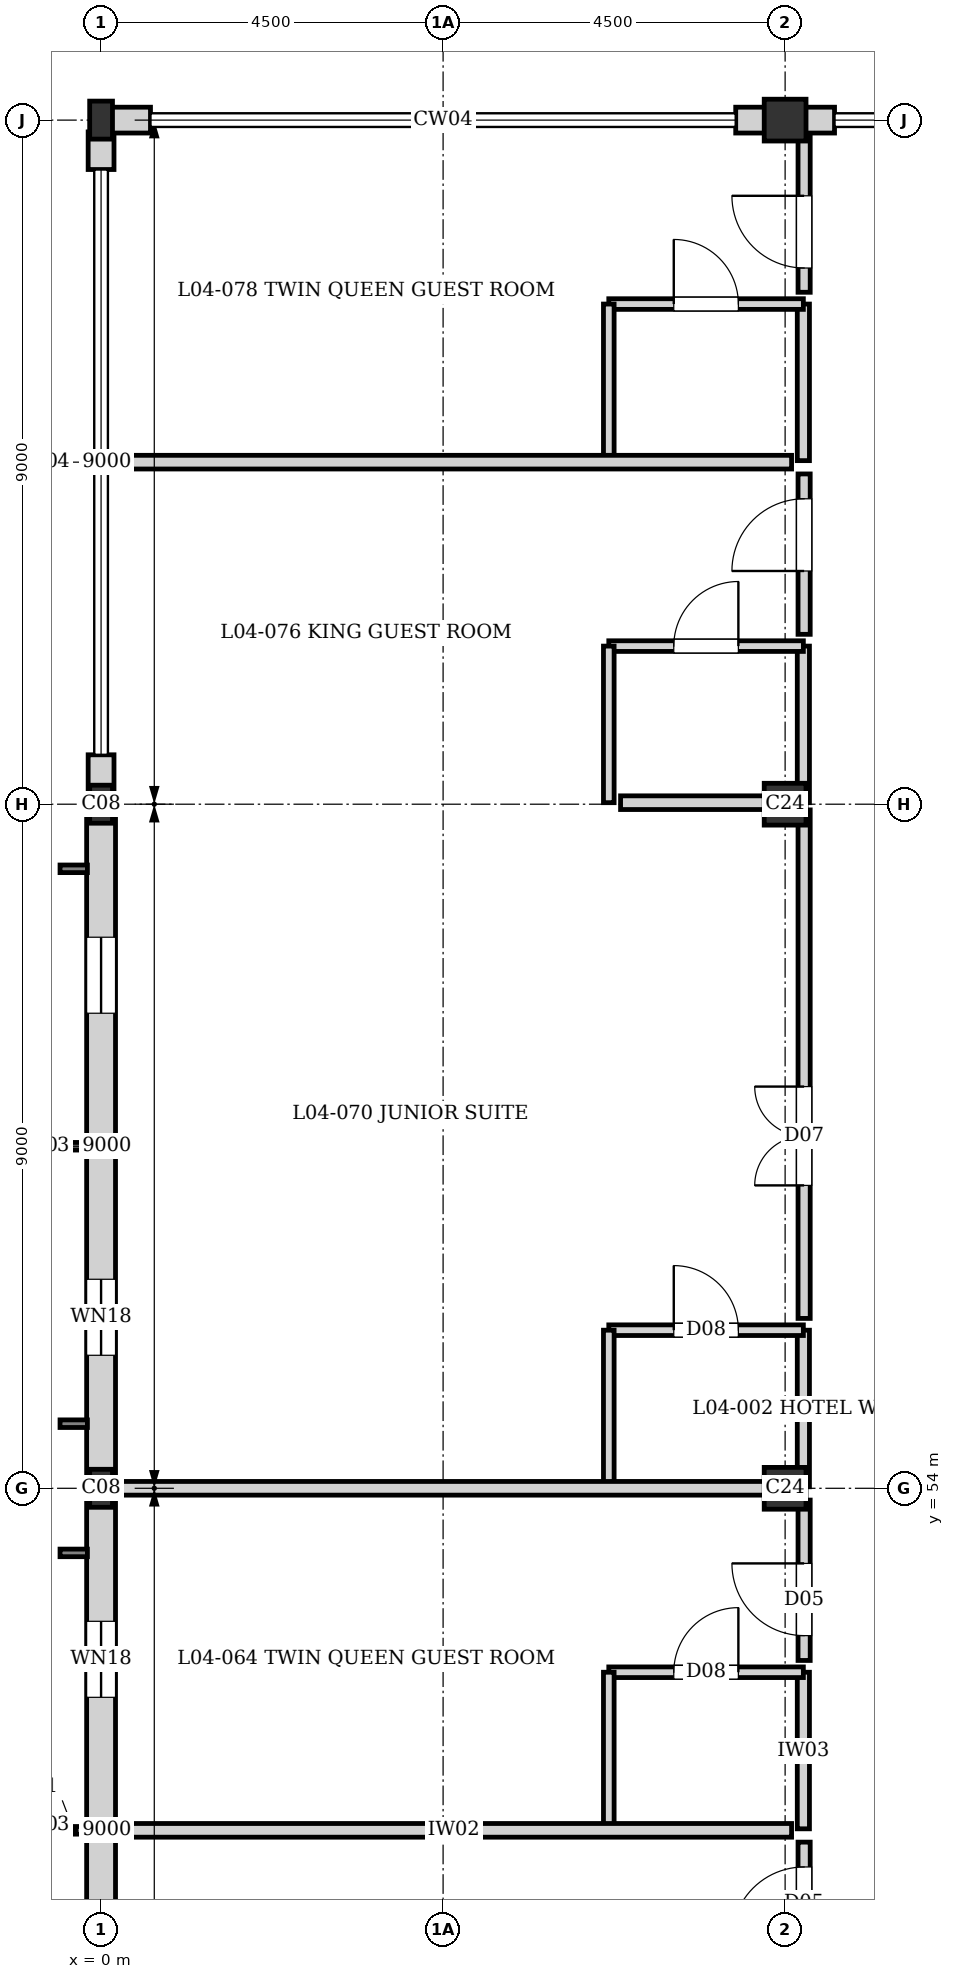
"""IFC4 building model, lengths in metres.
Left out: names, types, materials, properties, quantities, classifications, styles, units other than length and angle.
Written with IfcOpenShell. Run it as: python <this file> out.ifc"""

import sys

from ifc_helpers import new_model, si_unit, direction, frame, frame_2d, origin, origin_2d, place, context, subcontext, project, spatial, rectangle, i_section, extrude, element, fill, save


model = new_model("IFC4")
c1 = context("Model", 3, precision=1e-05, world=origin(), true_north=direction((0.0, 1.0)))
c2 = subcontext(c1, "Body", "Model", "MODEL_VIEW")
j1 = project(units=[si_unit("LENGTHUNIT", "METRE"), si_unit("PLANEANGLEUNIT", "RADIAN")], contexts=[c1])
p1 = place(None, origin())
s1 = spatial("IfcSite", under=j1, at=p1, CompositionType="ELEMENT")
p2 = place(p1, origin())
s2 = spatial("IfcBuilding", under=s1, at=p2, CompositionType="ELEMENT")
p3 = place(p2, frame((0.0, 0.0, 14.56)))
s3 = spatial("IfcBuildingStorey", under=s2, at=p3, CompositionType="ELEMENT", Elevation=14.56)
for number, where, z_axis, x_axis in (
    (1, (0.0, 54.0, 0.0), (0.0, 0.0, 1.0), (1.0, 0.0, 0.0)),
    (2, (0.0, 63.0, 0.0), (0.0, 0.0, 1.0), (1.0, 0.0, 0.0)),
    (3, (0.0, 72.0, 0.0), (0.0, 0.0, 1.0), (1.0, 0.0, 0.0)),
):
    element("IfcColumn", number, at=place(p3, frame(where, z_axis=z_axis, x_axis=x_axis)), inside=s3, PredefinedType="COLUMN", context=c2, shape_type="SweptSolid", body=[
        extrude(i_section(OverallWidth=0.3, OverallDepth=0.5, WebThickness=0.014, FlangeThickness=0.028, at=origin_2d()), origin(), (0.0, 0.0, 1.0), 3.04),
    ])
for number, where, z_axis, x_axis in (
    (4, (9.0, 54.0, 0.0), (0.0, 0.0, 1.0), (1.0, 0.0, 0.0)),
    (5, (9.0, 63.0, 0.0), (0.0, 0.0, 1.0), (1.0, 0.0, 0.0)),
    (6, (9.0, 72.0, 0.0), (0.0, 0.0, 1.0), (1.0, 0.0, 0.0)),
):
    element("IfcColumn", number, at=place(p3, frame(where, z_axis=z_axis, x_axis=x_axis)), inside=s3, PredefinedType="COLUMN", context=c2, shape_type="SweptSolid", body=[
        extrude(rectangle(XDim=0.55, YDim=0.55, at=origin_2d()), origin(), (0.0, 0.0, 1.0), 3.04),
    ])
p4 = place(p3, frame((0.0, 45.13, 0.0), z_axis=(0.0, 0.0, 1.0), x_axis=(0.0, 1.0, 0.0)))
e7 = element("IfcWall", 7, at=p4, inside=s3, PredefinedType="SOLIDWALL", context=c2, shape_type="SweptSolid", body=[
    extrude(rectangle(XDim=8.87, YDim=0.38, at=frame_2d((4.435, 0.0))), origin(), (0.0, 0.0, 1.0), 2.82),
])
p5 = place(p4, frame((1.62, 0.0, 0.35)))
e8 = element("IfcOpeningElement", 8, at=p5, cuts=e7, PredefinedType="OPENING", context=c2, shape_type="SweptSolid", body=[
    extrude(rectangle(XDim=1.0, YDim=1.6, at=frame_2d((0.5, 0.8))), frame((0.0, 0.2, 0.0), z_axis=(0.0, -1.0, 0.0), x_axis=(1.0, 0.0, 0.0)), (0.0, 0.0, 1.0), 0.4),
])
p6 = place(p4, frame((6.12, 0.0, 0.35)))
e9 = element("IfcOpeningElement", 9, at=p6, cuts=e7, PredefinedType="OPENING", context=c2, shape_type="SweptSolid", body=[
    extrude(rectangle(XDim=1.0, YDim=1.6, at=frame_2d((0.5, 0.8))), frame((0.0, 0.2, 0.0), z_axis=(0.0, -1.0, 0.0), x_axis=(1.0, 0.0, 0.0)), (0.0, 0.0, 1.0), 0.4),
])
p7 = place(p3, frame((0.0, 54.0, 0.0), z_axis=(0.0, 0.0, 1.0), x_axis=(0.0, 1.0, 0.0)))
e10 = element("IfcWall", 10, at=p7, inside=s3, PredefinedType="SOLIDWALL", context=c2, shape_type="SweptSolid", body=[
    extrude(rectangle(XDim=9.0, YDim=0.38, at=frame_2d((4.5, 0.0))), origin(), (0.0, 0.0, 1.0), 2.48),
])
p8 = place(p7, frame((1.75, 0.0, 0.35)))
e11 = element("IfcOpeningElement", 11, at=p8, cuts=e10, PredefinedType="OPENING", context=c2, shape_type="SweptSolid", body=[
    extrude(rectangle(XDim=1.0, YDim=1.6, at=frame_2d((0.5, 0.8))), frame((0.0, 0.2, 0.0), z_axis=(0.0, -1.0, 0.0), x_axis=(1.0, 0.0, 0.0)), (0.0, 0.0, 1.0), 0.4),
])
p9 = place(p7, frame((6.25, 0.0, 0.35)))
e12 = element("IfcOpeningElement", 12, at=p9, cuts=e10, PredefinedType="OPENING", context=c2, shape_type="SweptSolid", body=[
    extrude(rectangle(XDim=1.0, YDim=1.6, at=frame_2d((0.5, 0.8))), frame((0.0, 0.2, 0.0), z_axis=(0.0, -1.0, 0.0), x_axis=(1.0, 0.0, 0.0)), (0.0, 0.0, 1.0), 0.4),
])
p10 = place(p3, frame((0.0, 63.0, 0.0), z_axis=(0.0, 0.0, 1.0), x_axis=(0.0, 1.0, 0.0)))
e13 = element("IfcWall", 13, at=p10, inside=s3, PredefinedType="SOLIDWALL", context=c2, shape_type="SweptSolid", body=[
    extrude(rectangle(XDim=0.65, YDim=0.34, at=frame_2d((0.325, 0.0))), origin(), (0.0, 0.0, 1.0), 2.42),
])
p11 = place(p3, frame((0.0, 71.35, 0.0), z_axis=(0.0, 0.0, 1.0), x_axis=(0.0, 1.0, 0.0)))
e14 = element("IfcWall", 14, at=p11, inside=s3, PredefinedType="SOLIDWALL", context=c2, shape_type="SweptSolid", body=[
    extrude(rectangle(XDim=0.495, YDim=0.34, at=frame_2d((0.248, 0.0))), origin(), (0.0, 0.0, 1.0), 2.82),
])
for number, where, z_axis, x_axis in (
    (15, (0.0, 72.0, 0.0), (0.0, 0.0, 1.0), (1.0, 0.0, 0.0)),
    (16, (8.35, 72.0, 0.0), (0.0, 0.0, 1.0), (1.0, 0.0, 0.0)),
):
    element("IfcWall", number, at=place(p3, frame(where, z_axis=z_axis, x_axis=x_axis)), inside=s3, PredefinedType="SOLIDWALL", context=c2, shape_type="SweptSolid", body=[
        extrude(rectangle(XDim=0.65, YDim=0.34, at=frame_2d((0.325, 0.0))), origin(), (0.0, 0.0, 1.0), 2.42),
    ])
p12 = place(p3, frame((9.0, 72.0, 0.0), z_axis=(0.0, 0.0, 1.0), x_axis=(1.0, 0.0, 0.0)))
e17 = element("IfcWall", 17, at=p12, inside=s3, PredefinedType="SOLIDWALL", context=c2, shape_type="SweptSolid", body=[
    extrude(rectangle(XDim=0.65, YDim=0.34, at=frame_2d((0.325, 0.0))), origin(), (0.0, 0.0, 1.0), 2.38),
])
p13 = place(p3, frame((9.24, 49.52, 0.0), z_axis=(0.0, 0.0, 1.0), x_axis=(0.0, 1.0, 0.0)))
e18 = element("IfcWall", 18, at=p13, inside=s3, PredefinedType="PARTITIONING", context=c2, shape_type="SweptSolid", body=[
    extrude(rectangle(XDim=2.06, YDim=0.16, at=frame_2d((1.03, 0.0))), origin(), (0.0, 0.0, 1.0), 2.82),
])
p14 = place(p3, frame((6.68, 51.58, 0.0), z_axis=(0.0, 0.0, 1.0), x_axis=(1.0, 0.0, 0.0)))
e19 = element("IfcWall", 19, at=p14, inside=s3, PredefinedType="PLUMBINGWALL", context=c2, shape_type="SweptSolid", body=[
    extrude(rectangle(XDim=2.56, YDim=0.14, at=frame_2d((1.28, 0.0))), origin(), (0.0, 0.0, 1.0), 2.82),
])
p15 = place(p14, frame((0.855, 0.0, 0.0)))
e20 = element("IfcOpeningElement", 20, at=p15, cuts=e19, PredefinedType="OPENING", context=c2, shape_type="SweptSolid", body=[
    extrude(rectangle(XDim=0.85, YDim=2.04, at=frame_2d((0.425, 1.02))), frame((0.0, 0.08, 0.0), z_axis=(0.0, -1.0, 0.0), x_axis=(1.0, 0.0, 0.0)), (0.0, 0.0, 1.0), 0.16),
])
p16 = place(p3, frame((6.68, 49.52, 0.0), z_axis=(0.0, 0.0, 1.0), x_axis=(0.0, 1.0, 0.0)))
e21 = element("IfcWall", 21, at=p16, inside=s3, PredefinedType="PLUMBINGWALL", context=c2, shape_type="SweptSolid", body=[
    extrude(rectangle(XDim=2.06, YDim=0.14, at=frame_2d((1.03, 0.0))), origin(), (0.0, 0.0, 1.0), 2.82),
])
p17 = place(p3, frame((9.24, 54.02, 0.0), z_axis=(0.0, 0.0, 1.0), x_axis=(0.0, 1.0, 0.0)))
e22 = element("IfcWall", 22, at=p17, inside=s3, PredefinedType="PARTITIONING", context=c2, shape_type="SweptSolid", body=[
    extrude(rectangle(XDim=2.06, YDim=0.16, at=frame_2d((1.03, 0.0))), origin(), (0.0, 0.0, 1.0), 2.82),
])
p18 = place(p3, frame((6.68, 56.08, 0.0), z_axis=(0.0, 0.0, 1.0), x_axis=(1.0, 0.0, 0.0)))
e23 = element("IfcWall", 23, at=p18, inside=s3, PredefinedType="PLUMBINGWALL", context=c2, shape_type="SweptSolid", body=[
    extrude(rectangle(XDim=2.56, YDim=0.14, at=frame_2d((1.28, 0.0))), origin(), (0.0, 0.0, 1.0), 2.82),
])
p19 = place(p18, frame((0.855, 0.0, 0.0)))
e24 = element("IfcOpeningElement", 24, at=p19, cuts=e23, PredefinedType="OPENING", context=c2, shape_type="SweptSolid", body=[
    extrude(rectangle(XDim=0.85, YDim=2.04, at=frame_2d((0.425, 1.02))), frame((0.0, 0.08, 0.0), z_axis=(0.0, -1.0, 0.0), x_axis=(1.0, 0.0, 0.0)), (0.0, 0.0, 1.0), 0.16),
])
p20 = place(p3, frame((6.68, 54.02, 0.0), z_axis=(0.0, 0.0, 1.0), x_axis=(0.0, 1.0, 0.0)))
e25 = element("IfcWall", 25, at=p20, inside=s3, PredefinedType="PLUMBINGWALL", context=c2, shape_type="SweptSolid", body=[
    extrude(rectangle(XDim=2.06, YDim=0.14, at=frame_2d((1.03, 0.0))), origin(), (0.0, 0.0, 1.0), 2.82),
])
p21 = place(p3, frame((9.24, 63.02, 0.0), z_axis=(0.0, 0.0, 1.0), x_axis=(0.0, 1.0, 0.0)))
e26 = element("IfcWall", 26, at=p21, inside=s3, PredefinedType="PARTITIONING", context=c2, shape_type="SweptSolid", body=[
    extrude(rectangle(XDim=2.06, YDim=0.16, at=frame_2d((1.03, 0.0))), origin(), (0.0, 0.0, 1.0), 2.82),
])
p22 = place(p3, frame((6.68, 65.08, 0.0), z_axis=(0.0, 0.0, 1.0), x_axis=(1.0, 0.0, 0.0)))
e27 = element("IfcWall", 27, at=p22, inside=s3, PredefinedType="PLUMBINGWALL", context=c2, shape_type="SweptSolid", body=[
    extrude(rectangle(XDim=2.56, YDim=0.14, at=frame_2d((1.28, 0.0))), origin(), (0.0, 0.0, 1.0), 2.82),
])
p23 = place(p22, frame((0.855, 0.0, 0.0)))
e28 = element("IfcOpeningElement", 28, at=p23, cuts=e27, PredefinedType="OPENING", context=c2, shape_type="SweptSolid", body=[
    extrude(rectangle(XDim=0.85, YDim=2.04, at=frame_2d((0.425, 1.02))), frame((0.0, 0.08, 0.0), z_axis=(0.0, -1.0, 0.0), x_axis=(1.0, 0.0, 0.0)), (0.0, 0.0, 1.0), 0.16),
])
p24 = place(p3, frame((6.68, 63.02, 0.0), z_axis=(0.0, 0.0, 1.0), x_axis=(0.0, 1.0, 0.0)))
e29 = element("IfcWall", 29, at=p24, inside=s3, PredefinedType="PLUMBINGWALL", context=c2, shape_type="SweptSolid", body=[
    extrude(rectangle(XDim=2.06, YDim=0.14, at=frame_2d((1.03, 0.0))), origin(), (0.0, 0.0, 1.0), 2.82),
])
p25 = place(p3, frame((9.24, 67.52, 0.0), z_axis=(0.0, 0.0, 1.0), x_axis=(0.0, 1.0, 0.0)))
e30 = element("IfcWall", 30, at=p25, inside=s3, PredefinedType="PARTITIONING", context=c2, shape_type="SweptSolid", body=[
    extrude(rectangle(XDim=2.06, YDim=0.16, at=frame_2d((1.03, 0.0))), origin(), (0.0, 0.0, 1.0), 2.82),
])
p26 = place(p3, frame((6.68, 69.58, 0.0), z_axis=(0.0, 0.0, 1.0), x_axis=(1.0, 0.0, 0.0)))
e31 = element("IfcWall", 31, at=p26, inside=s3, PredefinedType="PLUMBINGWALL", context=c2, shape_type="SweptSolid", body=[
    extrude(rectangle(XDim=2.56, YDim=0.14, at=frame_2d((1.28, 0.0))), origin(), (0.0, 0.0, 1.0), 2.82),
])
p27 = place(p26, frame((0.855, 0.0, 0.0)))
e32 = element("IfcOpeningElement", 32, at=p27, cuts=e31, PredefinedType="OPENING", context=c2, shape_type="SweptSolid", body=[
    extrude(rectangle(XDim=0.85, YDim=2.04, at=frame_2d((0.425, 1.02))), frame((0.0, 0.08, 0.0), z_axis=(0.0, -1.0, 0.0), x_axis=(1.0, 0.0, 0.0)), (0.0, 0.0, 1.0), 0.16),
])
p28 = place(p3, frame((6.68, 67.52, 0.0), z_axis=(0.0, 0.0, 1.0), x_axis=(0.0, 1.0, 0.0)))
e33 = element("IfcWall", 33, at=p28, inside=s3, PredefinedType="PLUMBINGWALL", context=c2, shape_type="SweptSolid", body=[
    extrude(rectangle(XDim=2.06, YDim=0.14, at=frame_2d((1.03, 0.0))), origin(), (0.0, 0.0, 1.0), 2.82),
])
p29 = place(p3, frame((0.195, 49.5, 0.0), z_axis=(0.0, 0.0, 1.0), x_axis=(1.0, 0.0, 0.0)))
e34 = element("IfcWall", 34, at=p29, inside=s3, PredefinedType="PARTITIONING", context=c2, shape_type="SweptSolid", body=[
    extrude(rectangle(XDim=8.89, YDim=0.18, at=frame_2d((4.445, 0.0))), origin(), (0.0, 0.0, 1.0), 2.82),
])
p30 = place(p3, frame((0.195, 54.0, 0.0), z_axis=(0.0, 0.0, 1.0), x_axis=(1.0, 0.0, 0.0)))
e35 = element("IfcWall", 35, at=p30, inside=s3, PredefinedType="PARTITIONING", context=c2, shape_type="SweptSolid", body=[
    extrude(rectangle(XDim=8.89, YDim=0.18, at=frame_2d((4.445, 0.0))), origin(), (0.0, 0.0, 1.0), 2.42),
])
p31 = place(p3, frame((0.095, 67.5, 0.0), z_axis=(0.0, 0.0, 1.0), x_axis=(1.0, 0.0, 0.0)))
e36 = element("IfcWall", 36, at=p31, inside=s3, PredefinedType="PARTITIONING", context=c2, shape_type="SweptSolid", body=[
    extrude(rectangle(XDim=8.99, YDim=0.18, at=frame_2d((4.495, 0.0))), origin(), (0.0, 0.0, 1.0), 2.82),
])
p32 = place(p3, frame((6.835, 63.02, 0.0), z_axis=(0.0, 0.0, 1.0), x_axis=(1.0, 0.0, 0.0)))
e37 = element("IfcWall", 37, at=p32, inside=s3, PredefinedType="PARTITIONING", context=c2, shape_type="SweptSolid", body=[
    extrude(rectangle(XDim=2.25, YDim=0.18, at=frame_2d((1.125, 0.0))), origin(), (0.0, 0.0, 1.0), 2.42),
])
p33 = place(p3, frame((9.25, 47.235, 0.0), z_axis=(0.0, 0.0, 1.0), x_axis=(0.0, 1.0, 0.0)))
e38 = element("IfcWall", 38, at=p33, inside=s3, PredefinedType="PARTITIONING", context=c2, shape_type="SweptSolid", body=[
    extrude(rectangle(XDim=2.11, YDim=0.16, at=frame_2d((1.055, 0.0))), origin(), (0.0, 0.0, 1.0), 2.82),
])
p34 = place(p33, frame((0.833, 0.0, 0.0)))
e39 = element("IfcOpeningElement", 39, at=p34, cuts=e38, PredefinedType="OPENING", context=c2, shape_type="SweptSolid", body=[
    extrude(rectangle(XDim=0.95, YDim=2.15, at=frame_2d((0.475, 1.075))), frame((0.0, 0.09, 0.0), z_axis=(0.0, -1.0, 0.0), x_axis=(1.0, 0.0, 0.0)), (0.0, 0.0, 1.0), 0.18),
])
p35 = place(p3, frame((9.25, 51.735, 0.0), z_axis=(0.0, 0.0, 1.0), x_axis=(0.0, 1.0, 0.0)))
e40 = element("IfcWall", 40, at=p35, inside=s3, PredefinedType="PARTITIONING", context=c2, shape_type="SweptSolid", body=[
    extrude(rectangle(XDim=2.11, YDim=0.16, at=frame_2d((1.055, 0.0))), origin(), (0.0, 0.0, 1.0), 2.82),
])
p36 = place(p35, frame((0.327, 0.0, 0.0)))
e41 = element("IfcOpeningElement", 41, at=p36, cuts=e40, PredefinedType="OPENING", context=c2, shape_type="SweptSolid", body=[
    extrude(rectangle(XDim=0.95, YDim=2.15, at=frame_2d((0.475, 1.075))), frame((0.0, 0.09, 0.0), z_axis=(0.0, -1.0, 0.0), x_axis=(1.0, 0.0, 0.0)), (0.0, 0.0, 1.0), 0.18),
])
p37 = place(p3, frame((9.25, 56.235, 0.0), z_axis=(0.0, 0.0, 1.0), x_axis=(0.0, 1.0, 0.0)))
e42 = element("IfcWall", 42, at=p37, inside=s3, PredefinedType="PARTITIONING", context=c2, shape_type="SweptSolid", body=[
    extrude(rectangle(XDim=6.69, YDim=0.16, at=frame_2d((3.345, 0.0))), origin(), (0.0, 0.0, 1.0), 2.82),
])
p38 = place(p37, frame((1.75, 0.0, 0.0)))
e43 = element("IfcOpeningElement", 43, at=p38, cuts=e42, PredefinedType="OPENING", context=c2, shape_type="SweptSolid", body=[
    extrude(rectangle(XDim=1.3, YDim=2.25, at=frame_2d((0.65, 1.125))), frame((0.0, 0.09, 0.0), z_axis=(0.0, -1.0, 0.0), x_axis=(1.0, 0.0, 0.0)), (0.0, 0.0, 1.0), 0.18),
])
p39 = place(p3, frame((9.25, 65.235, 0.0), z_axis=(0.0, 0.0, 1.0), x_axis=(0.0, 1.0, 0.0)))
e44 = element("IfcWall", 44, at=p39, inside=s3, PredefinedType="PARTITIONING", context=c2, shape_type="SweptSolid", body=[
    extrude(rectangle(XDim=2.11, YDim=0.16, at=frame_2d((1.055, 0.0))), origin(), (0.0, 0.0, 1.0), 2.82),
])
p40 = place(p39, frame((0.833, 0.0, 0.0)))
e45 = element("IfcOpeningElement", 45, at=p40, cuts=e44, PredefinedType="OPENING", context=c2, shape_type="SweptSolid", body=[
    extrude(rectangle(XDim=0.95, YDim=2.15, at=frame_2d((0.475, 1.075))), frame((0.0, 0.09, 0.0), z_axis=(0.0, -1.0, 0.0), x_axis=(1.0, 0.0, 0.0)), (0.0, 0.0, 1.0), 0.18),
])
p41 = place(p3, frame((9.25, 69.735, 0.0), z_axis=(0.0, 0.0, 1.0), x_axis=(0.0, 1.0, 0.0)))
e46 = element("IfcWall", 46, at=p41, inside=s3, PredefinedType="PARTITIONING", context=c2, shape_type="SweptSolid", body=[
    extrude(rectangle(XDim=2.09, YDim=0.16, at=frame_2d((1.045, 0.0))), origin(), (0.0, 0.0, 1.0), 2.82),
])
p42 = place(p41, frame((0.319, 0.0, 0.0)))
e47 = element("IfcOpeningElement", 47, at=p42, cuts=e46, PredefinedType="OPENING", context=c2, shape_type="SweptSolid", body=[
    extrude(rectangle(XDim=0.95, YDim=2.15, at=frame_2d((0.475, 1.075))), frame((0.0, 0.09, 0.0), z_axis=(0.0, -1.0, 0.0), x_axis=(1.0, 0.0, 0.0)), (0.0, 0.0, 1.0), 0.18),
])
p43 = place(p6, origin())
e48 = element("IfcWindow", 48, at=p43, inside=s3, PartitioningType="SINGLE_PANEL", PredefinedType="WINDOW", context=c2, shape_type="SweptSolid", body=[
    extrude(rectangle(XDim=1.0, YDim=1.6, at=frame_2d((0.5, 0.8))), frame((0.0, 0.03, 0.0), z_axis=(0.0, -1.0, 0.0), x_axis=(1.0, 0.0, 0.0)), (0.0, 0.0, 1.0), 0.06),
])
fill(e9, e48)
p44 = place(p8, origin())
e49 = element("IfcWindow", 49, at=p44, inside=s3, PartitioningType="SINGLE_PANEL", PredefinedType="WINDOW", context=c2, shape_type="SweptSolid", body=[
    extrude(rectangle(XDim=1.0, YDim=1.6, at=frame_2d((0.5, 0.8))), frame((0.0, 0.03, 0.0), z_axis=(0.0, -1.0, 0.0), x_axis=(1.0, 0.0, 0.0)), (0.0, 0.0, 1.0), 0.06),
])
fill(e11, e49)
p45 = place(p9, origin())
e50 = element("IfcWindow", 50, at=p45, inside=s3, PartitioningType="SINGLE_PANEL", PredefinedType="WINDOW", context=c2, shape_type="SweptSolid", body=[
    extrude(rectangle(XDim=1.0, YDim=1.6, at=frame_2d((0.5, 0.8))), frame((0.0, 0.03, 0.0), z_axis=(0.0, -1.0, 0.0), x_axis=(1.0, 0.0, 0.0)), (0.0, 0.0, 1.0), 0.06),
])
fill(e12, e50)
p46 = place(p15, origin())
e51 = element("IfcDoor", 51, at=p46, inside=s3, OperationType="SINGLE_SWING_RIGHT", PredefinedType="DOOR", context=c2, shape_type="SweptSolid", body=[
    extrude(rectangle(XDim=0.85, YDim=2.04, at=frame_2d((0.425, 1.02))), frame((0.0, 0.025, 0.0), z_axis=(0.0, -1.0, 0.0), x_axis=(1.0, 0.0, 0.0)), (0.0, 0.0, 1.0), 0.05),
])
fill(e20, e51)
p47 = place(p19, origin())
e52 = element("IfcDoor", 52, at=p47, inside=s3, OperationType="SINGLE_SWING_LEFT", PredefinedType="DOOR", context=c2, shape_type="SweptSolid", body=[
    extrude(rectangle(XDim=0.85, YDim=2.04, at=frame_2d((0.425, 1.02))), frame((0.0, 0.025, 0.0), z_axis=(0.0, -1.0, 0.0), x_axis=(1.0, 0.0, 0.0)), (0.0, 0.0, 1.0), 0.05),
])
fill(e24, e52)
p48 = place(p23, origin())
e53 = element("IfcDoor", 53, at=p48, inside=s3, OperationType="SINGLE_SWING_RIGHT", PredefinedType="DOOR", context=c2, shape_type="SweptSolid", body=[
    extrude(rectangle(XDim=0.85, YDim=2.04, at=frame_2d((0.425, 1.02))), frame((0.0, 0.025, 0.0), z_axis=(0.0, -1.0, 0.0), x_axis=(1.0, 0.0, 0.0)), (0.0, 0.0, 1.0), 0.05),
])
fill(e28, e53)
p49 = place(p27, origin())
e54 = element("IfcDoor", 54, at=p49, inside=s3, OperationType="SINGLE_SWING_LEFT", PredefinedType="DOOR", context=c2, shape_type="SweptSolid", body=[
    extrude(rectangle(XDim=0.85, YDim=2.04, at=frame_2d((0.425, 1.02))), frame((0.0, 0.025, 0.0), z_axis=(0.0, -1.0, 0.0), x_axis=(1.0, 0.0, 0.0)), (0.0, 0.0, 1.0), 0.05),
])
fill(e32, e54)
p50 = place(p34, origin())
e55 = element("IfcDoor", 55, at=p50, inside=s3, OperationType="SINGLE_SWING_LEFT", PredefinedType="DOOR", context=c2, shape_type="SweptSolid", body=[
    extrude(rectangle(XDim=0.95, YDim=2.15, at=frame_2d((0.475, 1.075))), frame((0.0, 0.025, 0.0), z_axis=(0.0, -1.0, 0.0), x_axis=(1.0, 0.0, 0.0)), (0.0, 0.0, 1.0), 0.05),
])
fill(e39, e55)
p51 = place(p36, origin())
e56 = element("IfcDoor", 56, at=p51, inside=s3, OperationType="SINGLE_SWING_RIGHT", PredefinedType="DOOR", context=c2, shape_type="SweptSolid", body=[
    extrude(rectangle(XDim=0.95, YDim=2.15, at=frame_2d((0.475, 1.075))), frame((0.0, 0.025, 0.0), z_axis=(0.0, -1.0, 0.0), x_axis=(1.0, 0.0, 0.0)), (0.0, 0.0, 1.0), 0.05),
])
fill(e41, e56)
p52 = place(p38, origin())
e57 = element("IfcDoor", 57, at=p52, inside=s3, OperationType="DOUBLE_DOOR_SINGLE_SWING", PredefinedType="DOOR", context=c2, shape_type="SweptSolid", body=[
    extrude(rectangle(XDim=1.3, YDim=2.25, at=frame_2d((0.65, 1.125))), frame((0.0, 0.025, 0.0), z_axis=(0.0, -1.0, 0.0), x_axis=(1.0, 0.0, 0.0)), (0.0, 0.0, 1.0), 0.05),
])
fill(e43, e57)
p53 = place(p40, origin())
e58 = element("IfcDoor", 58, at=p53, inside=s3, OperationType="SINGLE_SWING_LEFT", PredefinedType="DOOR", context=c2, shape_type="SweptSolid", body=[
    extrude(rectangle(XDim=0.95, YDim=2.15, at=frame_2d((0.475, 1.075))), frame((0.0, 0.025, 0.0), z_axis=(0.0, -1.0, 0.0), x_axis=(1.0, 0.0, 0.0)), (0.0, 0.0, 1.0), 0.05),
])
fill(e45, e58)
p54 = place(p42, origin())
e59 = element("IfcDoor", 59, at=p54, inside=s3, OperationType="SINGLE_SWING_RIGHT", PredefinedType="DOOR", context=c2, shape_type="SweptSolid", body=[
    extrude(rectangle(XDim=0.95, YDim=2.15, at=frame_2d((0.475, 1.075))), frame((0.0, 0.025, 0.0), z_axis=(0.0, -1.0, 0.0), x_axis=(1.0, 0.0, 0.0)), (0.0, 0.0, 1.0), 0.05),
])
fill(e47, e59)
save(model, sys.argv[1])
